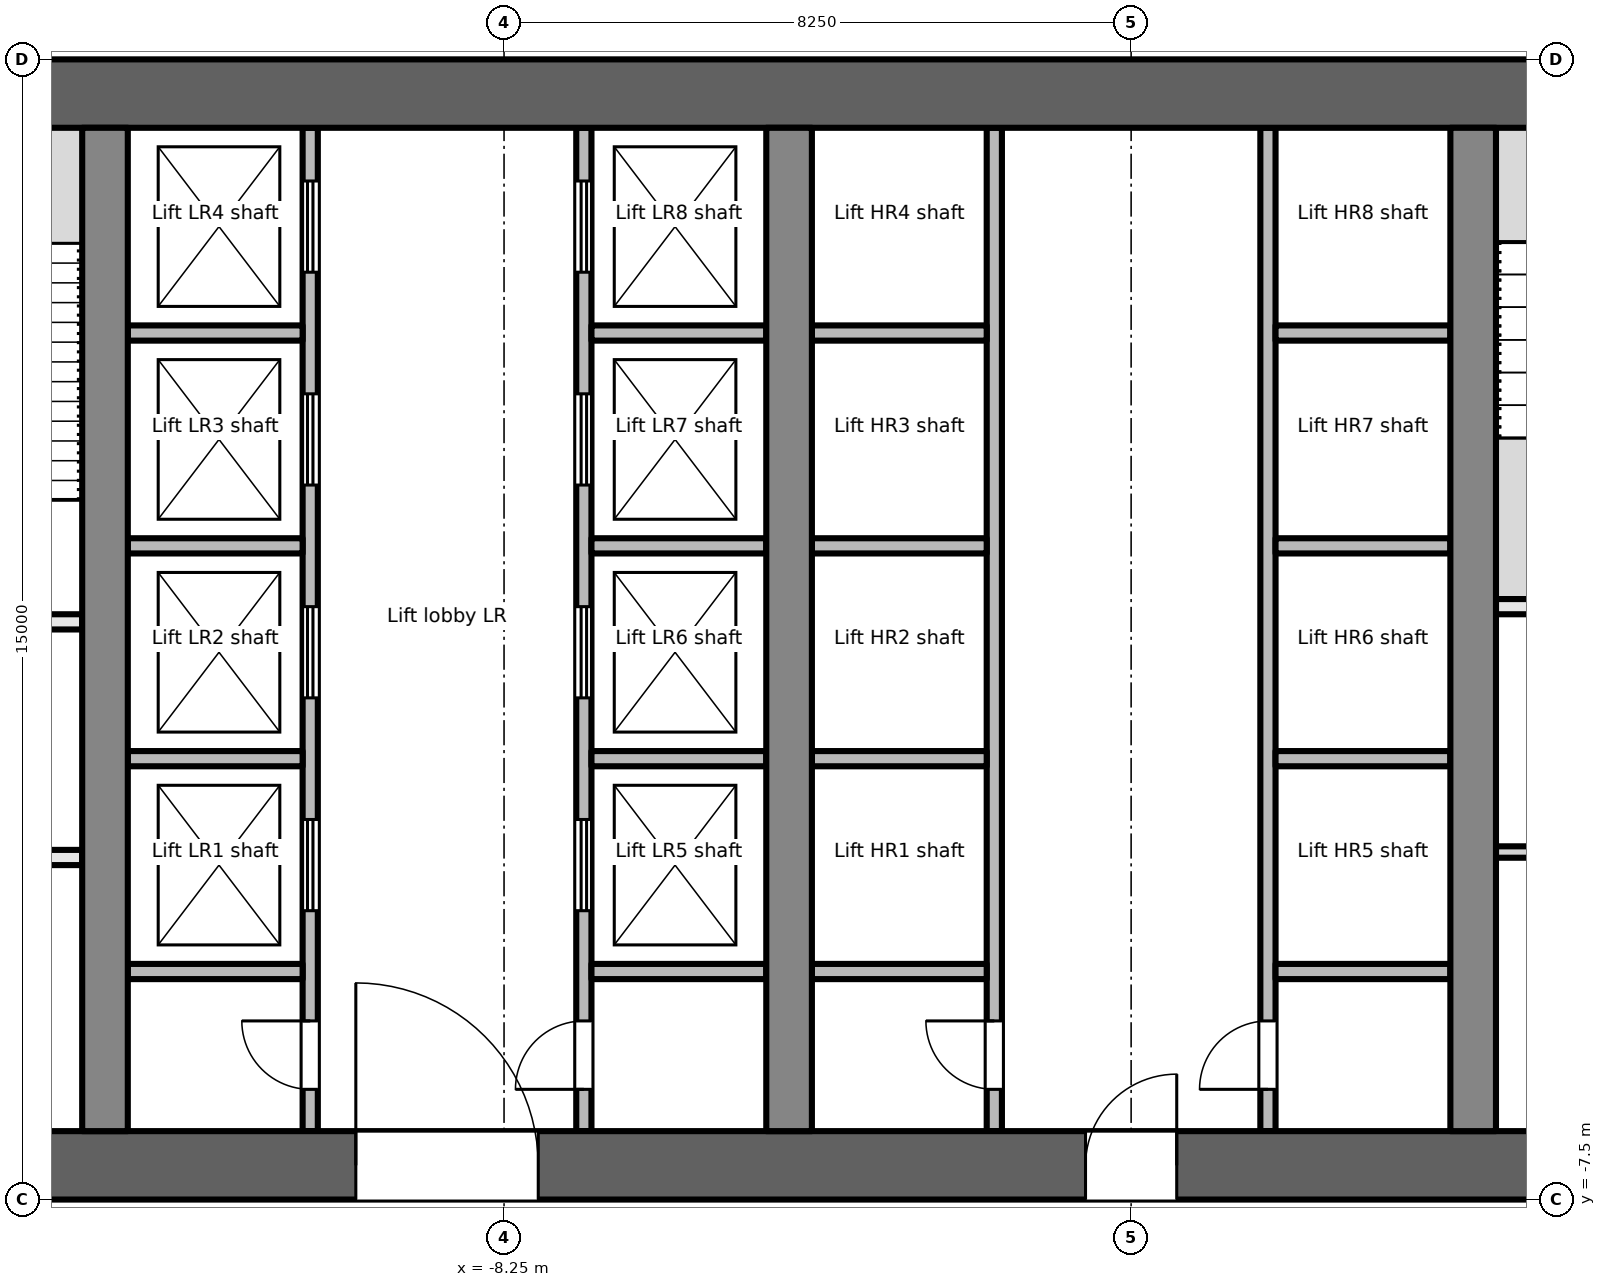
"""IFC4 building model, lengths in metres.
Left out: names, types, materials, properties, quantities, classifications, styles, units other than length and angle.
Written with IfcOpenShell. Run it as: python <this file> out.ifc"""

import sys

from ifc_helpers import new_model, si_unit, direction, frame, frame_2d, origin, place, context, subcontext, project, spatial, rectangle, extrude, element, fill, save


model = new_model("IFC4")
c1 = context("Model", 3, precision=1e-05, world=origin(), true_north=direction((0.0, 1.0)))
c2 = subcontext(c1, "Body", "Model", "MODEL_VIEW")
j1 = project(units=[si_unit("LENGTHUNIT", "METRE"), si_unit("PLANEANGLEUNIT", "RADIAN")], contexts=[c1])
p1 = place(None, origin())
s1 = spatial("IfcSite", under=j1, at=p1, CompositionType="ELEMENT")
p2 = place(p1, origin())
s2 = spatial("IfcBuilding", under=s1, at=p2, CompositionType="ELEMENT")
p3 = place(p2, frame((0.0, 0.0, 115.7)))
s3 = spatial("IfcBuildingStorey", under=s2, at=p3, CompositionType="ELEMENT", Elevation=115.7)
p4 = place(p3, frame((-18.0, -7.05, -0.2), z_axis=(0.0, 0.0, 1.0), x_axis=(1.0, 0.0, 0.0)))
e1 = element("IfcWall", 1, at=p4, inside=s3, PredefinedType="SHEAR", context=c2, shape_type="SweptSolid", body=[
    extrude(rectangle(XDim=36.0, YDim=0.9, at=frame_2d((18.0, 0.0))), origin(), (0.0, 0.0, 1.0), 5.0),
])
p5 = place(p4, frame((7.8, 0.0, 0.2)))
e2 = element("IfcOpeningElement", 2, at=p5, cuts=e1, PredefinedType="OPENING", context=c2, shape_type="SweptSolid", body=[
    extrude(rectangle(XDim=2.4, YDim=2.1, at=frame_2d((1.2, 1.05))), frame((0.0, 0.46, 0.0), z_axis=(0.0, -1.0, 0.0), x_axis=(1.0, 0.0, 0.0)), (0.0, 0.0, 1.0), 0.921),
])
p6 = place(p4, frame((17.4, 0.0, 0.2)))
e3 = element("IfcOpeningElement", 3, at=p6, cuts=e1, PredefinedType="OPENING", context=c2, shape_type="SweptSolid", body=[
    extrude(rectangle(XDim=1.2, YDim=2.1, at=frame_2d((0.6, 1.05))), frame((0.0, 0.46, 0.0), z_axis=(0.0, -1.0, 0.0), x_axis=(1.0, 0.0, 0.0)), (0.0, 0.0, 1.0), 0.921),
])
p7 = place(p4, frame((26.1, 0.0, 0.2)))
e4 = element("IfcOpeningElement", 4, at=p7, cuts=e1, PredefinedType="OPENING", context=c2, shape_type="SweptSolid", body=[
    extrude(rectangle(XDim=2.4, YDim=2.1, at=frame_2d((1.2, 1.05))), frame((0.0, 0.46, 0.0), z_axis=(0.0, -1.0, 0.0), x_axis=(1.0, 0.0, 0.0)), (0.0, 0.0, 1.0), 0.921),
])
p8 = place(p3, frame((-18.0, 7.05, -0.2), z_axis=(0.0, 0.0, 1.0), x_axis=(1.0, 0.0, 0.0)))
e5 = element("IfcWall", 5, at=p8, inside=s3, PredefinedType="SHEAR", context=c2, shape_type="SweptSolid", body=[
    extrude(rectangle(XDim=36.0, YDim=0.9, at=frame_2d((18.0, 0.0))), origin(), (0.0, 0.0, 1.0), 5.0),
])
for number, where, z_axis, x_axis in (
    (6, (-13.5, -6.6, -0.2), (0.0, 0.0, 1.0), (0.0, 1.0, 0.0)),
    (7, (-4.5, -6.6, -0.2), (0.0, 0.0, 1.0), (0.0, 1.0, 0.0)),
    (8, (4.5, -6.6, -0.2), (0.0, 0.0, 1.0), (0.0, 1.0, 0.0)),
):
    element("IfcWall", number, at=place(p3, frame(where, z_axis=z_axis, x_axis=x_axis)), inside=s3, PredefinedType="SHEAR", context=c2, shape_type="SweptSolid", body=[
        extrude(rectangle(XDim=13.2, YDim=0.6, at=frame_2d((6.6, 0.0))), origin(), (0.0, 0.0, 1.0), 5.0),
    ])
p9 = place(p3, frame((-17.1, -3.0, 0.0), z_axis=(0.0, 0.0, 1.0), x_axis=(1.0, 0.0, 0.0)))
e9 = element("IfcWall", 9, at=p9, inside=s3, PredefinedType="PARTITIONING", context=c2, shape_type="SweptSolid", body=[
    extrude(rectangle(XDim=3.3, YDim=0.2, at=frame_2d((1.65, 0.0))), origin(), (0.0, 0.0, 1.0), 4.8),
])
p10 = place(p9, frame((1.1, 0.0, 0.0)))
e10 = element("IfcOpeningElement", 10, at=p10, cuts=e9, PredefinedType="OPENING", context=c2, shape_type="SweptSolid", body=[
    extrude(rectangle(XDim=1.1, YDim=2.1, at=frame_2d((0.55, 1.05))), frame((0.0, 0.111, 0.0), z_axis=(0.0, -1.0, 0.0), x_axis=(1.0, 0.0, 0.0)), (0.0, 0.0, 1.0), 0.221),
])
p11 = place(p3, frame((-17.1, 0.1, 0.0), z_axis=(0.0, 0.0, 1.0), x_axis=(1.0, 0.0, 0.0)))
e11 = element("IfcWall", 11, at=p11, inside=s3, PredefinedType="PARTITIONING", context=c2, shape_type="SweptSolid", body=[
    extrude(rectangle(XDim=3.3, YDim=0.2, at=frame_2d((1.65, 0.0))), origin(), (0.0, 0.0, 1.0), 4.8),
])
p12 = place(p11, frame((1.1, 0.0, 0.0)))
e12 = element("IfcOpeningElement", 12, at=p12, cuts=e11, PredefinedType="OPENING", context=c2, shape_type="SweptSolid", body=[
    extrude(rectangle(XDim=1.1, YDim=2.1, at=frame_2d((0.55, 1.05))), frame((0.0, 0.111, 0.0), z_axis=(0.0, -1.0, 0.0), x_axis=(1.0, 0.0, 0.0)), (0.0, 0.0, 1.0), 0.221),
])
p13 = place(p3, frame((-10.8, -6.6, 0.0), z_axis=(0.0, 0.0, 1.0), x_axis=(0.0, 1.0, 0.0)))
e13 = element("IfcWall", 13, at=p13, inside=s3, PredefinedType="PARTITIONING", context=c2, shape_type="SweptSolid", body=[
    extrude(rectangle(XDim=13.2, YDim=0.2, at=frame_2d((6.6, 0.0))), origin(), (0.0, 0.0, 1.0), 4.8),
])
p14 = place(p13, frame((0.55, 0.0, 0.0)))
e14 = element("IfcOpeningElement", 14, at=p14, cuts=e13, PredefinedType="OPENING", context=c2, shape_type="SweptSolid", body=[
    extrude(rectangle(XDim=0.9, YDim=2.1, at=frame_2d((0.45, 1.05))), frame((0.0, 0.111, 0.0), z_axis=(0.0, -1.0, 0.0), x_axis=(1.0, 0.0, 0.0)), (0.0, 0.0, 1.0), 0.221),
])
p15 = place(p13, frame((2.9, 0.0, 0.0)))
e15 = element("IfcOpeningElement", 15, at=p15, cuts=e13, PredefinedType="OPENING", context=c2, shape_type="SweptSolid", body=[
    extrude(rectangle(XDim=1.2, YDim=2.1, at=frame_2d((0.6, 1.05))), frame((0.0, 0.111, 0.0), z_axis=(0.0, -1.0, 0.0), x_axis=(1.0, 0.0, 0.0)), (0.0, 0.0, 1.0), 0.221),
])
p16 = place(p13, frame((5.7, 0.0, 0.0)))
e16 = element("IfcOpeningElement", 16, at=p16, cuts=e13, PredefinedType="OPENING", context=c2, shape_type="SweptSolid", body=[
    extrude(rectangle(XDim=1.2, YDim=2.1, at=frame_2d((0.6, 1.05))), frame((0.0, 0.111, 0.0), z_axis=(0.0, -1.0, 0.0), x_axis=(1.0, 0.0, 0.0)), (0.0, 0.0, 1.0), 0.221),
])
p17 = place(p13, frame((8.5, 0.0, 0.0)))
e17 = element("IfcOpeningElement", 17, at=p17, cuts=e13, PredefinedType="OPENING", context=c2, shape_type="SweptSolid", body=[
    extrude(rectangle(XDim=1.2, YDim=2.1, at=frame_2d((0.6, 1.05))), frame((0.0, 0.111, 0.0), z_axis=(0.0, -1.0, 0.0), x_axis=(1.0, 0.0, 0.0)), (0.0, 0.0, 1.0), 0.221),
])
p18 = place(p13, frame((11.3, 0.0, 0.0)))
e18 = element("IfcOpeningElement", 18, at=p18, cuts=e13, PredefinedType="OPENING", context=c2, shape_type="SweptSolid", body=[
    extrude(rectangle(XDim=1.2, YDim=2.1, at=frame_2d((0.6, 1.05))), frame((0.0, 0.111, 0.0), z_axis=(0.0, -1.0, 0.0), x_axis=(1.0, 0.0, 0.0)), (0.0, 0.0, 1.0), 0.221),
])
p19 = place(p3, frame((-7.2, -6.6, 0.0), z_axis=(0.0, 0.0, 1.0), x_axis=(0.0, 1.0, 0.0)))
e19 = element("IfcWall", 19, at=p19, inside=s3, PredefinedType="PARTITIONING", context=c2, shape_type="SweptSolid", body=[
    extrude(rectangle(XDim=13.2, YDim=0.2, at=frame_2d((6.6, 0.0))), origin(), (0.0, 0.0, 1.0), 4.8),
])
p20 = place(p19, frame((0.55, 0.0, 0.0)))
e20 = element("IfcOpeningElement", 20, at=p20, cuts=e19, PredefinedType="OPENING", context=c2, shape_type="SweptSolid", body=[
    extrude(rectangle(XDim=0.9, YDim=2.1, at=frame_2d((0.45, 1.05))), frame((0.0, 0.111, 0.0), z_axis=(0.0, -1.0, 0.0), x_axis=(1.0, 0.0, 0.0)), (0.0, 0.0, 1.0), 0.221),
])
p21 = place(p19, frame((2.9, 0.0, 0.0)))
e21 = element("IfcOpeningElement", 21, at=p21, cuts=e19, PredefinedType="OPENING", context=c2, shape_type="SweptSolid", body=[
    extrude(rectangle(XDim=1.2, YDim=2.1, at=frame_2d((0.6, 1.05))), frame((0.0, 0.111, 0.0), z_axis=(0.0, -1.0, 0.0), x_axis=(1.0, 0.0, 0.0)), (0.0, 0.0, 1.0), 0.221),
])
p22 = place(p19, frame((5.7, 0.0, 0.0)))
e22 = element("IfcOpeningElement", 22, at=p22, cuts=e19, PredefinedType="OPENING", context=c2, shape_type="SweptSolid", body=[
    extrude(rectangle(XDim=1.2, YDim=2.1, at=frame_2d((0.6, 1.05))), frame((0.0, 0.111, 0.0), z_axis=(0.0, -1.0, 0.0), x_axis=(1.0, 0.0, 0.0)), (0.0, 0.0, 1.0), 0.221),
])
p23 = place(p19, frame((8.5, 0.0, 0.0)))
e23 = element("IfcOpeningElement", 23, at=p23, cuts=e19, PredefinedType="OPENING", context=c2, shape_type="SweptSolid", body=[
    extrude(rectangle(XDim=1.2, YDim=2.1, at=frame_2d((0.6, 1.05))), frame((0.0, 0.111, 0.0), z_axis=(0.0, -1.0, 0.0), x_axis=(1.0, 0.0, 0.0)), (0.0, 0.0, 1.0), 0.221),
])
p24 = place(p19, frame((11.3, 0.0, 0.0)))
e24 = element("IfcOpeningElement", 24, at=p24, cuts=e19, PredefinedType="OPENING", context=c2, shape_type="SweptSolid", body=[
    extrude(rectangle(XDim=1.2, YDim=2.1, at=frame_2d((0.6, 1.05))), frame((0.0, 0.111, 0.0), z_axis=(0.0, -1.0, 0.0), x_axis=(1.0, 0.0, 0.0)), (0.0, 0.0, 1.0), 0.221),
])
for number, where, z_axis, x_axis in (
    (25, (-13.2, -1.7, 0.0), (0.0, 0.0, 1.0), (1.0, 0.0, 0.0)),
    (26, (-13.2, 1.1, 0.0), (0.0, 0.0, 1.0), (1.0, 0.0, 0.0)),
    (27, (-13.2, 3.9, 0.0), (0.0, 0.0, 1.0), (1.0, 0.0, 0.0)),
    (28, (-13.2, -4.5, 0.0), (0.0, 0.0, 1.0), (1.0, 0.0, 0.0)),
    (29, (-7.1, -1.7, 0.0), (0.0, 0.0, 1.0), (1.0, 0.0, 0.0)),
    (30, (-7.1, 1.1, 0.0), (0.0, 0.0, 1.0), (1.0, 0.0, 0.0)),
    (31, (-7.1, 3.9, 0.0), (0.0, 0.0, 1.0), (1.0, 0.0, 0.0)),
    (32, (-7.1, -4.5, 0.0), (0.0, 0.0, 1.0), (1.0, 0.0, 0.0)),
):
    element("IfcWall", number, at=place(p3, frame(where, z_axis=z_axis, x_axis=x_axis)), inside=s3, PredefinedType="PARTITIONING", context=c2, shape_type="SweptSolid", body=[
        extrude(rectangle(XDim=2.3, YDim=0.2, at=frame_2d((1.15, 0.0))), origin(), (0.0, 0.0, 1.0), 4.8),
    ])
p25 = place(p3, frame((-1.8, -6.6, 0.0), z_axis=(0.0, 0.0, 1.0), x_axis=(0.0, 1.0, 0.0)))
e33 = element("IfcWall", 33, at=p25, inside=s3, PredefinedType="PARTITIONING", context=c2, shape_type="SweptSolid", body=[
    extrude(rectangle(XDim=13.2, YDim=0.2, at=frame_2d((6.6, 0.0))), origin(), (0.0, 0.0, 1.0), 4.8),
])
p26 = place(p25, frame((0.55, 0.0, 0.0)))
e34 = element("IfcOpeningElement", 34, at=p26, cuts=e33, PredefinedType="OPENING", context=c2, shape_type="SweptSolid", body=[
    extrude(rectangle(XDim=0.9, YDim=2.1, at=frame_2d((0.45, 1.05))), frame((0.0, 0.111, 0.0), z_axis=(0.0, -1.0, 0.0), x_axis=(1.0, 0.0, 0.0)), (0.0, 0.0, 1.0), 0.221),
])
p27 = place(p3, frame((1.8, -6.6, 0.0), z_axis=(0.0, 0.0, 1.0), x_axis=(0.0, 1.0, 0.0)))
e35 = element("IfcWall", 35, at=p27, inside=s3, PredefinedType="PARTITIONING", context=c2, shape_type="SweptSolid", body=[
    extrude(rectangle(XDim=13.2, YDim=0.2, at=frame_2d((6.6, 0.0))), origin(), (0.0, 0.0, 1.0), 4.8),
])
p28 = place(p27, frame((0.55, 0.0, 0.0)))
e36 = element("IfcOpeningElement", 36, at=p28, cuts=e35, PredefinedType="OPENING", context=c2, shape_type="SweptSolid", body=[
    extrude(rectangle(XDim=0.9, YDim=2.1, at=frame_2d((0.45, 1.05))), frame((0.0, 0.111, 0.0), z_axis=(0.0, -1.0, 0.0), x_axis=(1.0, 0.0, 0.0)), (0.0, 0.0, 1.0), 0.221),
])
for number, where, z_axis, x_axis in (
    (37, (-4.2, -1.7, 0.0), (0.0, 0.0, 1.0), (1.0, 0.0, 0.0)),
    (38, (-4.2, 1.1, 0.0), (0.0, 0.0, 1.0), (1.0, 0.0, 0.0)),
    (39, (-4.2, 3.9, 0.0), (0.0, 0.0, 1.0), (1.0, 0.0, 0.0)),
    (40, (-4.2, -4.5, 0.0), (0.0, 0.0, 1.0), (1.0, 0.0, 0.0)),
    (41, (1.9, -1.7, 0.0), (0.0, 0.0, 1.0), (1.0, 0.0, 0.0)),
    (42, (1.9, 1.1, 0.0), (0.0, 0.0, 1.0), (1.0, 0.0, 0.0)),
    (43, (1.9, 3.9, 0.0), (0.0, 0.0, 1.0), (1.0, 0.0, 0.0)),
    (44, (1.9, -4.5, 0.0), (0.0, 0.0, 1.0), (1.0, 0.0, 0.0)),
):
    element("IfcWall", number, at=place(p3, frame(where, z_axis=z_axis, x_axis=x_axis)), inside=s3, PredefinedType="PARTITIONING", context=c2, shape_type="SweptSolid", body=[
        extrude(rectangle(XDim=2.3, YDim=0.2, at=frame_2d((1.15, 0.0))), origin(), (0.0, 0.0, 1.0), 4.8),
    ])
p29 = place(p3, frame((4.8, 0.3, 0.0), z_axis=(0.0, 0.0, 1.0), x_axis=(1.0, 0.0, 0.0)))
e45 = element("IfcWall", 45, at=p29, inside=s3, PredefinedType="PARTITIONING", context=c2, shape_type="SweptSolid", body=[
    extrude(rectangle(XDim=3.15, YDim=0.2, at=frame_2d((1.575, 0.0))), origin(), (0.0, 0.0, 1.0), 4.8),
])
p30 = place(p3, frame((4.8, -2.928, 0.0), z_axis=(0.0, 0.0, 1.0), x_axis=(1.0, 0.0, 0.0)))
e46 = element("IfcWall", 46, at=p30, inside=s3, PredefinedType="PARTITIONING", context=c2, shape_type="SweptSolid", body=[
    extrude(rectangle(XDim=3.15, YDim=0.15, at=frame_2d((1.575, 0.0))), origin(), (0.0, 0.0, 1.0), 4.8),
])
p31 = place(p14, origin())
e47 = element("IfcDoor", 47, at=p31, inside=s3, OperationType="SINGLE_SWING_RIGHT", PredefinedType="DOOR", context=c2, shape_type="SweptSolid", body=[
    extrude(rectangle(XDim=0.9, YDim=2.1, at=frame_2d((0.45, 1.05))), frame((0.0, 0.025, 0.0), z_axis=(0.0, -1.0, 0.0), x_axis=(1.0, 0.0, 0.0)), (0.0, 0.0, 1.0), 0.05),
])
fill(e14, e47)
p32 = place(p15, origin())
e48 = element("IfcDoor", 48, at=p32, inside=s3, OperationType="DOUBLE_DOOR_SLIDING", PredefinedType="DOOR", context=c2, shape_type="SweptSolid", body=[
    extrude(rectangle(XDim=1.2, YDim=2.1, at=frame_2d((0.6, 1.05))), frame((0.0, 0.025, 0.0), z_axis=(0.0, -1.0, 0.0), x_axis=(1.0, 0.0, 0.0)), (0.0, 0.0, 1.0), 0.05),
])
fill(e15, e48)
p33 = place(p16, origin())
e49 = element("IfcDoor", 49, at=p33, inside=s3, OperationType="DOUBLE_DOOR_SLIDING", PredefinedType="DOOR", context=c2, shape_type="SweptSolid", body=[
    extrude(rectangle(XDim=1.2, YDim=2.1, at=frame_2d((0.6, 1.05))), frame((0.0, 0.025, 0.0), z_axis=(0.0, -1.0, 0.0), x_axis=(1.0, 0.0, 0.0)), (0.0, 0.0, 1.0), 0.05),
])
fill(e16, e49)
p34 = place(p17, origin())
e50 = element("IfcDoor", 50, at=p34, inside=s3, OperationType="DOUBLE_DOOR_SLIDING", PredefinedType="DOOR", context=c2, shape_type="SweptSolid", body=[
    extrude(rectangle(XDim=1.2, YDim=2.1, at=frame_2d((0.6, 1.05))), frame((0.0, 0.025, 0.0), z_axis=(0.0, -1.0, 0.0), x_axis=(1.0, 0.0, 0.0)), (0.0, 0.0, 1.0), 0.05),
])
fill(e17, e50)
p35 = place(p18, origin())
e51 = element("IfcDoor", 51, at=p35, inside=s3, OperationType="DOUBLE_DOOR_SLIDING", PredefinedType="DOOR", context=c2, shape_type="SweptSolid", body=[
    extrude(rectangle(XDim=1.2, YDim=2.1, at=frame_2d((0.6, 1.05))), frame((0.0, 0.025, 0.0), z_axis=(0.0, -1.0, 0.0), x_axis=(1.0, 0.0, 0.0)), (0.0, 0.0, 1.0), 0.05),
])
fill(e18, e51)
p36 = place(p20, origin())
e52 = element("IfcDoor", 52, at=p36, inside=s3, OperationType="SINGLE_SWING_LEFT", PredefinedType="DOOR", context=c2, shape_type="SweptSolid", body=[
    extrude(rectangle(XDim=0.9, YDim=2.1, at=frame_2d((0.45, 1.05))), frame((0.0, 0.025, 0.0), z_axis=(0.0, -1.0, 0.0), x_axis=(1.0, 0.0, 0.0)), (0.0, 0.0, 1.0), 0.05),
])
fill(e20, e52)
p37 = place(p21, origin())
e53 = element("IfcDoor", 53, at=p37, inside=s3, OperationType="DOUBLE_DOOR_SLIDING", PredefinedType="DOOR", context=c2, shape_type="SweptSolid", body=[
    extrude(rectangle(XDim=1.2, YDim=2.1, at=frame_2d((0.6, 1.05))), frame((0.0, 0.025, 0.0), z_axis=(0.0, -1.0, 0.0), x_axis=(1.0, 0.0, 0.0)), (0.0, 0.0, 1.0), 0.05),
])
fill(e21, e53)
p38 = place(p22, origin())
e54 = element("IfcDoor", 54, at=p38, inside=s3, OperationType="DOUBLE_DOOR_SLIDING", PredefinedType="DOOR", context=c2, shape_type="SweptSolid", body=[
    extrude(rectangle(XDim=1.2, YDim=2.1, at=frame_2d((0.6, 1.05))), frame((0.0, 0.025, 0.0), z_axis=(0.0, -1.0, 0.0), x_axis=(1.0, 0.0, 0.0)), (0.0, 0.0, 1.0), 0.05),
])
fill(e22, e54)
p39 = place(p23, origin())
e55 = element("IfcDoor", 55, at=p39, inside=s3, OperationType="DOUBLE_DOOR_SLIDING", PredefinedType="DOOR", context=c2, shape_type="SweptSolid", body=[
    extrude(rectangle(XDim=1.2, YDim=2.1, at=frame_2d((0.6, 1.05))), frame((0.0, 0.025, 0.0), z_axis=(0.0, -1.0, 0.0), x_axis=(1.0, 0.0, 0.0)), (0.0, 0.0, 1.0), 0.05),
])
fill(e23, e55)
p40 = place(p24, origin())
e56 = element("IfcDoor", 56, at=p40, inside=s3, OperationType="DOUBLE_DOOR_SLIDING", PredefinedType="DOOR", context=c2, shape_type="SweptSolid", body=[
    extrude(rectangle(XDim=1.2, YDim=2.1, at=frame_2d((0.6, 1.05))), frame((0.0, 0.025, 0.0), z_axis=(0.0, -1.0, 0.0), x_axis=(1.0, 0.0, 0.0)), (0.0, 0.0, 1.0), 0.05),
])
fill(e24, e56)
p41 = place(p5, origin())
e57 = element("IfcDoor", 57, at=p41, inside=s3, OperationType="DOUBLE_DOOR_DOUBLE_SWING", PredefinedType="DOOR", context=c2, shape_type="SweptSolid", body=[
    extrude(rectangle(XDim=2.4, YDim=2.1, at=frame_2d((1.2, 1.05))), frame((0.0, 0.025, 0.0), z_axis=(0.0, -1.0, 0.0), x_axis=(1.0, 0.0, 0.0)), (0.0, 0.0, 1.0), 0.05),
])
fill(e2, e57)
p42 = place(p26, origin())
e58 = element("IfcDoor", 58, at=p42, inside=s3, OperationType="SINGLE_SWING_RIGHT", PredefinedType="DOOR", context=c2, shape_type="SweptSolid", body=[
    extrude(rectangle(XDim=0.9, YDim=2.1, at=frame_2d((0.45, 1.05))), frame((0.0, 0.025, 0.0), z_axis=(0.0, -1.0, 0.0), x_axis=(1.0, 0.0, 0.0)), (0.0, 0.0, 1.0), 0.05),
])
fill(e34, e58)
p43 = place(p28, origin())
e59 = element("IfcDoor", 59, at=p43, inside=s3, OperationType="SINGLE_SWING_LEFT", PredefinedType="DOOR", context=c2, shape_type="SweptSolid", body=[
    extrude(rectangle(XDim=0.9, YDim=2.1, at=frame_2d((0.45, 1.05))), frame((0.0, 0.025, 0.0), z_axis=(0.0, -1.0, 0.0), x_axis=(1.0, 0.0, 0.0)), (0.0, 0.0, 1.0), 0.05),
])
fill(e36, e59)
p44 = place(p6, origin())
e60 = element("IfcDoor", 60, at=p44, inside=s3, OperationType="SINGLE_SWING_RIGHT", PredefinedType="DOOR", context=c2, shape_type="SweptSolid", body=[
    extrude(rectangle(XDim=1.2, YDim=2.1, at=frame_2d((0.6, 1.05))), frame((0.0, 0.025, 0.0), z_axis=(0.0, -1.0, 0.0), x_axis=(1.0, 0.0, 0.0)), (0.0, 0.0, 1.0), 0.05),
])
fill(e3, e60)
save(model, sys.argv[1])
